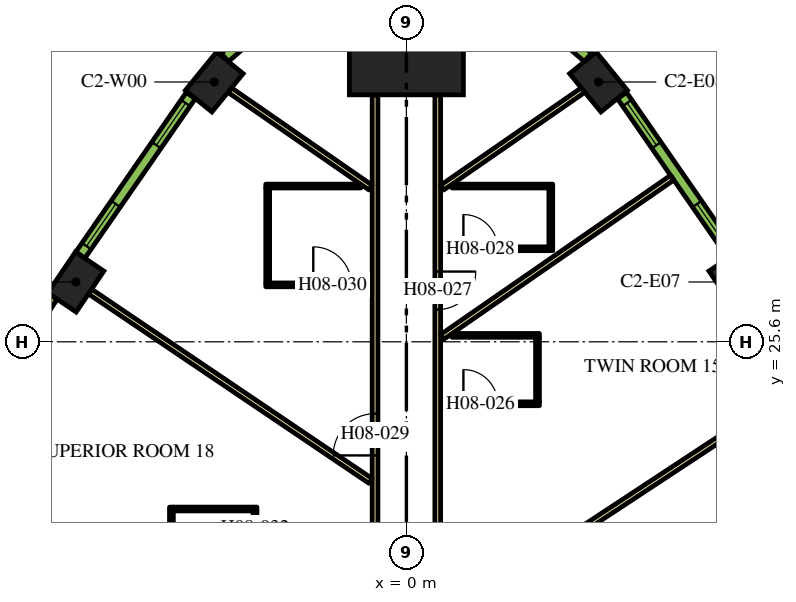
"""IFC4 building model, lengths in metres.
Left out: names, types, materials, properties, quantities, classifications, styles, units other than length and angle.
Written with IfcOpenShell. Run it as: python <this file> out.ifc"""

import sys

from ifc_helpers import new_model, si_unit, direction, frame, frame_2d, origin, origin_2d, place, context, subcontext, project, spatial, rectangle, extrude, element, fill, save


model = new_model("IFC4")
c1 = context("Model", 3, precision=1e-05, world=origin(), true_north=direction((0.0, 1.0)))
c2 = subcontext(c1, "Body", "Model", "MODEL_VIEW")
j1 = project(units=[si_unit("LENGTHUNIT", "METRE"), si_unit("PLANEANGLEUNIT", "RADIAN")], contexts=[c1])
p1 = place(None, origin())
s1 = spatial("IfcSite", under=j1, at=p1, CompositionType="ELEMENT")
p2 = place(p1, origin())
s2 = spatial("IfcBuilding", under=s1, at=p2, CompositionType="ELEMENT")
p3 = place(p2, frame((0.0, 0.0, 111.0)))
s3 = spatial("IfcBuildingStorey", under=s2, at=p3, CompositionType="ELEMENT", Elevation=111.0)
p4 = place(p3, frame((0.0, 33.598, 0.0), z_axis=(0.0, 0.0, 1.0), x_axis=(0.0, 1.0, 0.0)))
e1 = element("IfcColumn", 1, at=p4, inside=s3, PredefinedType="COLUMN", context=c2, shape_type="SweptSolid", body=[
    extrude(rectangle(XDim=3.0, YDim=3.0, at=origin_2d()), origin(), (0.0, 0.0, 1.0), 3.9),
])
for number, where, z_axis, x_axis in (
    (2, (8.699, 27.174, 0.0), (0.0, 0.0, 1.0), (-0.559, 0.829, 0.0)),
    (3, (5.056, 32.437, 0.0), (0.0, 0.0, 1.0), (-0.632, 0.775, 0.0)),
    (4, (-5.056, 32.437, 0.0), (0.0, 0.0, 1.0), (-0.632, -0.775, 0.0)),
    (5, (-8.699, 27.174, 0.0), (0.0, 0.0, 1.0), (-0.559, -0.829, 0.0)),
):
    element("IfcColumn", number, at=place(p3, frame(where, z_axis=z_axis, x_axis=x_axis)), inside=s3, PredefinedType="COLUMN", context=c2, shape_type="SweptSolid", body=[
        extrude(rectangle(XDim=1.3, YDim=0.9, at=origin_2d()), origin(), (0.0, 0.0, 1.0), 3.9),
    ])
p5 = place(p3, frame((0.825, 32.098, 0.0), z_axis=(0.0, 0.0, 1.0), x_axis=(0.0, -1.0, 0.0)))
e6 = element("IfcWall", 6, at=p5, inside=s3, PredefinedType="PARTITIONING", context=c2, shape_type="SweptSolid", body=[
    extrude(rectangle(XDim=13.543, YDim=0.15, at=frame_2d((6.772, 0.0))), origin(), (0.0, 0.0, 1.0), 2.75),
])
p6 = place(p5, frame((12.213, 0.0, 0.0)))
e7 = element("IfcOpeningElement", 7, at=p6, cuts=e6, PredefinedType="OPENING", context=c2, shape_type="SweptSolid", body=[
    extrude(rectangle(XDim=1.0, YDim=2.1, at=frame_2d((0.5, 1.05))), frame((0.0, 0.085, 0.0), z_axis=(0.0, -1.0, 0.0), x_axis=(1.0, 0.0, 0.0)), (0.0, 0.0, 1.0), 0.17),
])
p7 = place(p5, frame((4.65, 0.0, 0.0)))
e8 = element("IfcOpeningElement", 8, at=p7, cuts=e6, PredefinedType="OPENING", context=c2, shape_type="SweptSolid", body=[
    extrude(rectangle(XDim=1.0, YDim=2.1, at=frame_2d((0.5, 1.05))), frame((0.0, 0.085, 0.0), z_axis=(0.0, -1.0, 0.0), x_axis=(1.0, 0.0, 0.0)), (0.0, 0.0, 1.0), 0.17),
])
p8 = place(p3, frame((-0.825, 18.475, 0.0), z_axis=(0.0, 0.0, 1.0), x_axis=(0.0, 1.0, 0.0)))
e9 = element("IfcWall", 9, at=p8, inside=s3, PredefinedType="PARTITIONING", context=c2, shape_type="SweptSolid", body=[
    extrude(rectangle(XDim=13.623, YDim=0.15, at=frame_2d((6.812, 0.0))), origin(), (0.0, 0.0, 1.0), 2.75),
])
p9 = place(p8, frame((4.135, 0.0, 0.0)))
e10 = element("IfcOpeningElement", 10, at=p9, cuts=e9, PredefinedType="OPENING", context=c2, shape_type="SweptSolid", body=[
    extrude(rectangle(XDim=1.1, YDim=2.1, at=frame_2d((0.55, 1.05))), frame((0.0, 0.085, 0.0), z_axis=(0.0, -1.0, 0.0), x_axis=(1.0, 0.0, 0.0)), (0.0, 0.0, 1.0), 0.17),
])
p10 = place(p3, frame((-11.838, 21.585, 0.0), z_axis=(0.0, 0.0, 1.0), x_axis=(0.841699322813, -0.539946525108, 0.0)))
e11 = element("IfcWall", 11, at=p10, inside=s3, PredefinedType="PARTITIONING", context=c2, shape_type="SweptSolid", body=[
    extrude(rectangle(XDim=6.392, YDim=0.15, at=frame_2d((3.196, 0.0))), origin(), (0.0, 0.0, 1.0), 2.75),
])
p11 = place(p3, frame((-8.326, 26.923, 0.0), z_axis=(0.0, 0.0, 1.0), x_axis=(0.828836601893, -0.5594907393, 0.0)))
e12 = element("IfcWall", 12, at=p11, inside=s3, PredefinedType="PARTITIONING", context=c2, shape_type="SweptSolid", body=[
    extrude(rectangle(XDim=8.909, YDim=0.15, at=frame_2d((4.455, 0.0))), origin(), (0.0, 0.0, 1.0), 2.75),
])
p12 = place(p3, frame((-4.649, 32.223, 0.0), z_axis=(0.0, 0.0, 1.0), x_axis=(0.822262349475, -0.569108626394, 0.0)))
e13 = element("IfcWall", 13, at=p12, inside=s3, PredefinedType="PARTITIONING", context=c2, shape_type="SweptSolid", body=[
    extrude(rectangle(XDim=4.51, YDim=0.15, at=frame_2d((2.255, 0.0))), origin(), (0.0, 0.0, 1.0), 2.75),
])
p13 = place(p3, frame((6.994, 29.917, 0.0), z_axis=(0.0, 0.0, 1.0), x_axis=(-0.822255462494, -0.569118576747, 0.0)))
e14 = element("IfcWall", 14, at=p13, inside=s3, PredefinedType="PARTITIONING", context=c2, shape_type="SweptSolid", body=[
    extrude(rectangle(XDim=7.362, YDim=0.15, at=frame_2d((3.681, 0.0))), origin(), (0.0, 0.0, 1.0), 2.75),
])
p14 = place(p3, frame((10.592, 24.589, 0.0), z_axis=(0.0, 0.0, 1.0), x_axis=(-0.835337323748, -0.549737715236, 0.0)))
e15 = element("IfcWall", 15, at=p14, inside=s3, PredefinedType="PARTITIONING", context=c2, shape_type="SweptSolid", body=[
    extrude(rectangle(XDim=10.875, YDim=0.15, at=frame_2d((5.438, 0.0))), origin(), (0.0, 0.0, 1.0), 2.75),
])
p15 = place(p3, frame((4.649, 32.223, 0.0), z_axis=(0.0, 0.0, 1.0), x_axis=(-0.822262349475, -0.569108626394, 0.0)))
e16 = element("IfcWall", 16, at=p15, inside=s3, PredefinedType="PARTITIONING", context=c2, shape_type="SweptSolid", body=[
    extrude(rectangle(XDim=4.51, YDim=0.15, at=frame_2d((2.255, 0.0))), origin(), (0.0, 0.0, 1.0), 2.75),
])
p16 = place(p3, frame((0.9, 23.969, 0.0), z_axis=(0.0, 0.0, 1.0), x_axis=(1.0, 0.0, 0.0)))
e17 = element("IfcWall", 17, at=p16, inside=s3, PredefinedType="PARTITIONING", context=c2, shape_type="SweptSolid", body=[
    extrude(rectangle(XDim=2.6, YDim=0.1, at=frame_2d((1.3, 0.0))), origin(), (0.0, 0.0, 1.0), 2.75),
])
p17 = place(p16, frame((0.6, 0.0, 0.0)))
e18 = element("IfcOpeningElement", 18, at=p17, cuts=e17, PredefinedType="OPENING", context=c2, shape_type="SweptSolid", body=[
    extrude(rectangle(XDim=0.9, YDim=2.1, at=frame_2d((0.45, 1.05))), frame((0.0, 0.06, 0.0), z_axis=(0.0, -1.0, 0.0), x_axis=(1.0, 0.0, 0.0)), (0.0, 0.0, 1.0), 0.12),
])
p18 = place(p3, frame((3.45, 24.019, 0.0), z_axis=(0.0, 0.0, 1.0), x_axis=(0.0, 1.0, 0.0)))
e19 = element("IfcWall", 19, at=p18, inside=s3, PredefinedType="PARTITIONING", context=c2, shape_type="SweptSolid", body=[
    extrude(rectangle(XDim=1.7, YDim=0.1, at=frame_2d((0.85, 0.0))), origin(), (0.0, 0.0, 1.0), 2.75),
])
p19 = place(p3, frame((1.2, 25.769, 0.0), z_axis=(0.0, 0.0, 1.0), x_axis=(1.0, 0.0, 0.0)))
e20 = element("IfcWall", 20, at=p19, inside=s3, PredefinedType="PARTITIONING", context=c2, shape_type="SweptSolid", body=[
    extrude(rectangle(XDim=2.3, YDim=0.1, at=frame_2d((1.15, 0.0))), origin(), (0.0, 0.0, 1.0), 2.75),
])
p20 = place(p3, frame((0.9, 28.048, 0.0), z_axis=(0.0, 0.0, 1.0), x_axis=(1.0, 0.0, 0.0)))
e21 = element("IfcWall", 21, at=p20, inside=s3, PredefinedType="PARTITIONING", context=c2, shape_type="SweptSolid", body=[
    extrude(rectangle(XDim=2.95, YDim=0.1, at=frame_2d((1.475, 0.0))), origin(), (0.0, 0.0, 1.0), 2.75),
])
p21 = place(p20, frame((0.6, 0.0, 0.0)))
e22 = element("IfcOpeningElement", 22, at=p21, cuts=e21, PredefinedType="OPENING", context=c2, shape_type="SweptSolid", body=[
    extrude(rectangle(XDim=0.9, YDim=2.1, at=frame_2d((0.45, 1.05))), frame((0.0, 0.06, 0.0), z_axis=(0.0, -1.0, 0.0), x_axis=(1.0, 0.0, 0.0)), (0.0, 0.0, 1.0), 0.12),
])
p22 = place(p3, frame((3.8, 28.098, 0.0), z_axis=(0.0, 0.0, 1.0), x_axis=(0.0, 1.0, 0.0)))
e23 = element("IfcWall", 23, at=p22, inside=s3, PredefinedType="PARTITIONING", context=c2, shape_type="SweptSolid", body=[
    extrude(rectangle(XDim=1.55, YDim=0.1, at=frame_2d((0.775, 0.0))), origin(), (0.0, 0.0, 1.0), 2.75),
])
p23 = place(p3, frame((1.2, 29.698, 0.0), z_axis=(0.0, 0.0, 1.0), x_axis=(1.0, 0.0, 0.0)))
e24 = element("IfcWall", 24, at=p23, inside=s3, PredefinedType="PARTITIONING", context=c2, shape_type="SweptSolid", body=[
    extrude(rectangle(XDim=2.65, YDim=0.1, at=frame_2d((1.325, 0.0))), origin(), (0.0, 0.0, 1.0), 2.75),
])
p24 = place(p3, frame((-3.7, 27.098, 0.0), z_axis=(0.0, 0.0, 1.0), x_axis=(1.0, 0.0, 0.0)))
e25 = element("IfcWall", 25, at=p24, inside=s3, PredefinedType="PARTITIONING", context=c2, shape_type="SweptSolid", body=[
    extrude(rectangle(XDim=2.8, YDim=0.1, at=frame_2d((1.4, 0.0))), origin(), (0.0, 0.0, 1.0), 2.75),
])
p25 = place(p24, frame((1.25, 0.0, 0.0)))
e26 = element("IfcOpeningElement", 26, at=p25, cuts=e25, PredefinedType="OPENING", context=c2, shape_type="SweptSolid", body=[
    extrude(rectangle(XDim=1.0, YDim=2.1, at=frame_2d((0.5, 1.05))), frame((0.0, 0.06, 0.0), z_axis=(0.0, -1.0, 0.0), x_axis=(1.0, 0.0, 0.0)), (0.0, 0.0, 1.0), 0.12),
])
for number, where, z_axis, x_axis in (
    (27, (-3.65, 27.148, 0.0), (0.0, 0.0, 1.0), (0.0, 1.0, 0.0)),
    (28, (-1.2, 29.698, 0.0), (0.0, 0.0, 1.0), (-1.0, 0.0, 0.0)),
):
    element("IfcWall", number, at=place(p3, frame(where, z_axis=z_axis, x_axis=x_axis)), inside=s3, PredefinedType="PARTITIONING", context=c2, shape_type="SweptSolid", body=[
        extrude(rectangle(XDim=2.5, YDim=0.1, at=frame_2d((1.25, 0.0))), origin(), (0.0, 0.0, 1.0), 2.75),
    ])
p26 = place(p3, frame((-3.983, 18.55, 0.0), z_axis=(0.0, 0.0, 1.0), x_axis=(0.0, 1.0, 0.0)))
e29 = element("IfcWall", 29, at=p26, inside=s3, PredefinedType="PARTITIONING", context=c2, shape_type="SweptSolid", body=[
    extrude(rectangle(XDim=2.7, YDim=0.1, at=frame_2d((1.35, 0.0))), origin(), (0.0, 0.0, 1.0), 2.75),
])
p27 = place(p26, frame((0.6, 0.0, 0.0)))
e30 = element("IfcOpeningElement", 30, at=p27, cuts=e29, PredefinedType="OPENING", context=c2, shape_type="SweptSolid", body=[
    extrude(rectangle(XDim=0.9, YDim=2.1, at=frame_2d((0.45, 1.05))), frame((0.0, 0.06, 0.0), z_axis=(0.0, -1.0, 0.0), x_axis=(1.0, 0.0, 0.0)), (0.0, 0.0, 1.0), 0.12),
])
p28 = place(p3, frame((-4.033, 21.2, 0.0), z_axis=(0.0, 0.0, 1.0), x_axis=(-1.0, 0.0, 0.0)))
e31 = element("IfcWall", 31, at=p28, inside=s3, PredefinedType="PARTITIONING", context=c2, shape_type="SweptSolid", body=[
    extrude(rectangle(XDim=2.1, YDim=0.1, at=frame_2d((1.05, 0.0))), origin(), (0.0, 0.0, 1.0), 2.75),
])
p29 = place(p3, frame((-6.183, 18.55, 0.0), z_axis=(0.0, 0.0, 1.0), x_axis=(0.0, 1.0, 0.0)))
e32 = element("IfcWall", 32, at=p29, inside=s3, PredefinedType="PARTITIONING", context=c2, shape_type="SweptSolid", body=[
    extrude(rectangle(XDim=2.7, YDim=0.1, at=frame_2d((1.35, 0.0))), origin(), (0.0, 0.0, 1.0), 2.75),
])
p30 = place(p3, frame((8.58, 27.882, 0.0), z_axis=(0.0, 0.0, 1.0), x_axis=(-0.569113019126, 0.822259309136, 0.0)))
e33 = element("IfcWall", 33, at=p30, inside=s3, PredefinedType="SOLIDWALL", context=c2, shape_type="SweptSolid", body=[
    extrude(rectangle(XDim=5.107, YDim=0.29, at=frame_2d((2.553, 0.0))), origin(), (0.0, 0.0, 1.0), 3.65),
])
p31 = place(p30, frame((0.285, 0.0, 0.9)))
e34 = element("IfcOpeningElement", 34, at=p31, cuts=e33, PredefinedType="OPENING", context=c2, shape_type="SweptSolid", body=[
    extrude(rectangle(XDim=1.35, YDim=2.15, at=frame_2d((0.675, 1.075))), frame((0.0, 0.155, 0.0), z_axis=(0.0, -1.0, 0.0), x_axis=(1.0, 0.0, 0.0)), (0.0, 0.0, 1.0), 0.31),
])
p32 = place(p30, frame((3.516, 0.0, 0.9)))
e35 = element("IfcOpeningElement", 35, at=p32, cuts=e33, PredefinedType="OPENING", context=c2, shape_type="SweptSolid", body=[
    extrude(rectangle(XDim=1.35, YDim=2.15, at=frame_2d((0.675, 1.075))), frame((0.0, 0.155, 0.0), z_axis=(0.0, -1.0, 0.0), x_axis=(1.0, 0.0, 0.0)), (0.0, 0.0, 1.0), 0.31),
])
p33 = place(p3, frame((4.778, 33.082, 0.0), z_axis=(0.0, 0.0, 1.0), x_axis=(-0.754882764627, 0.655859749999, 0.0)))
e36 = element("IfcWall", 36, at=p33, inside=s3, PredefinedType="SOLIDWALL", context=c2, shape_type="SweptSolid", body=[
    extrude(rectangle(XDim=1.82, YDim=0.29, at=frame_2d((0.91, 0.0))), origin(), (0.0, 0.0, 1.0), 3.65),
])
p34 = place(p33, frame((0.46, 0.0, 0.9)))
e37 = element("IfcOpeningElement", 37, at=p34, cuts=e36, PredefinedType="OPENING", context=c2, shape_type="SweptSolid", body=[
    extrude(rectangle(XDim=0.9, YDim=2.15, at=frame_2d((0.45, 1.075))), frame((0.0, 0.155, 0.0), z_axis=(0.0, -1.0, 0.0), x_axis=(1.0, 0.0, 0.0)), (0.0, 0.0, 1.0), 0.31),
])
p35 = place(p3, frame((-3.405, 34.275, 0.0), z_axis=(0.0, 0.0, 1.0), x_axis=(-0.754882764627, -0.655859749999, 0.0)))
e38 = element("IfcWall", 38, at=p35, inside=s3, PredefinedType="SOLIDWALL", context=c2, shape_type="SweptSolid", body=[
    extrude(rectangle(XDim=1.82, YDim=0.29, at=frame_2d((0.91, 0.0))), origin(), (0.0, 0.0, 1.0), 3.65),
])
p36 = place(p35, frame((0.46, 0.0, 0.9)))
e39 = element("IfcOpeningElement", 39, at=p36, cuts=e38, PredefinedType="OPENING", context=c2, shape_type="SweptSolid", body=[
    extrude(rectangle(XDim=0.9, YDim=2.15, at=frame_2d((0.45, 1.075))), frame((0.0, 0.155, 0.0), z_axis=(0.0, -1.0, 0.0), x_axis=(1.0, 0.0, 0.0)), (0.0, 0.0, 1.0), 0.31),
])
p37 = place(p3, frame((-5.673, 32.081, 0.0), z_axis=(0.0, 0.0, 1.0), x_axis=(-0.569113019126, -0.822259309136, 0.0)))
e40 = element("IfcWall", 40, at=p37, inside=s3, PredefinedType="SOLIDWALL", context=c2, shape_type="SweptSolid", body=[
    extrude(rectangle(XDim=5.107, YDim=0.29, at=frame_2d((2.553, 0.0))), origin(), (0.0, 0.0, 1.0), 3.65),
])
p38 = place(p37, frame((0.24, 0.0, 0.9)))
e41 = element("IfcOpeningElement", 41, at=p38, cuts=e40, PredefinedType="OPENING", context=c2, shape_type="SweptSolid", body=[
    extrude(rectangle(XDim=1.35, YDim=2.15, at=frame_2d((0.675, 1.075))), frame((0.0, 0.155, 0.0), z_axis=(0.0, -1.0, 0.0), x_axis=(1.0, 0.0, 0.0)), (0.0, 0.0, 1.0), 0.31),
])
p39 = place(p37, frame((3.471, 0.0, 0.9)))
e42 = element("IfcOpeningElement", 42, at=p39, cuts=e40, PredefinedType="OPENING", context=c2, shape_type="SweptSolid", body=[
    extrude(rectangle(XDim=1.35, YDim=2.15, at=frame_2d((0.675, 1.075))), frame((0.0, 0.155, 0.0), z_axis=(0.0, -1.0, 0.0), x_axis=(1.0, 0.0, 0.0)), (0.0, 0.0, 1.0), 0.31),
])
p40 = place(p3, frame((-9.311, 26.799, 0.0), z_axis=(0.0, 0.0, 1.0), x_axis=(-0.549741341923, -0.835334937005, 0.0)))
e43 = element("IfcWall", 43, at=p40, inside=s3, PredefinedType="SOLIDWALL", context=c2, shape_type="SweptSolid", body=[
    extrude(rectangle(XDim=5.1, YDim=0.29, at=frame_2d((2.55, 0.0))), origin(), (0.0, 0.0, 1.0), 3.65),
])
p41 = place(p40, frame((0.273, 0.0, 0.9)))
e44 = element("IfcOpeningElement", 44, at=p41, cuts=e43, PredefinedType="OPENING", context=c2, shape_type="SweptSolid", body=[
    extrude(rectangle(XDim=1.35, YDim=2.15, at=frame_2d((0.675, 1.075))), frame((0.0, 0.155, 0.0), z_axis=(0.0, -1.0, 0.0), x_axis=(1.0, 0.0, 0.0)), (0.0, 0.0, 1.0), 0.31),
])
p42 = place(p40, frame((3.478, 0.0, 0.9)))
e45 = element("IfcOpeningElement", 45, at=p42, cuts=e43, PredefinedType="OPENING", context=c2, shape_type="SweptSolid", body=[
    extrude(rectangle(XDim=1.35, YDim=2.15, at=frame_2d((0.675, 1.075))), frame((0.0, 0.155, 0.0), z_axis=(0.0, -1.0, 0.0), x_axis=(1.0, 0.0, 0.0)), (0.0, 0.0, 1.0), 0.31),
])
p43 = place(p17, origin())
e46 = element("IfcDoor", 46, at=p43, inside=s3, OperationType="SINGLE_SWING_RIGHT", PredefinedType="DOOR", context=c2, shape_type="SweptSolid", body=[
    extrude(rectangle(XDim=0.9, YDim=2.1, at=frame_2d((0.45, 1.05))), frame((0.0, 0.025, 0.0), z_axis=(0.0, -1.0, 0.0), x_axis=(1.0, 0.0, 0.0)), (0.0, 0.0, 1.0), 0.05),
])
fill(e18, e46)
p44 = place(p7, origin())
e47 = element("IfcDoor", 47, at=p44, inside=s3, OperationType="SINGLE_SWING_RIGHT", PredefinedType="DOOR", context=c2, shape_type="SweptSolid", body=[
    extrude(rectangle(XDim=1.0, YDim=2.1, at=frame_2d((0.5, 1.05))), frame((0.0, 0.025, 0.0), z_axis=(0.0, -1.0, 0.0), x_axis=(1.0, 0.0, 0.0)), (0.0, 0.0, 1.0), 0.05),
])
fill(e8, e47)
p45 = place(p21, origin())
e48 = element("IfcDoor", 48, at=p45, inside=s3, OperationType="SINGLE_SWING_LEFT", PredefinedType="DOOR", context=c2, shape_type="SweptSolid", body=[
    extrude(rectangle(XDim=0.9, YDim=2.1, at=frame_2d((0.45, 1.05))), frame((0.0, 0.025, 0.0), z_axis=(0.0, -1.0, 0.0), x_axis=(1.0, 0.0, 0.0)), (0.0, 0.0, 1.0), 0.05),
])
fill(e22, e48)
p46 = place(p9, origin())
e49 = element("IfcDoor", 49, at=p46, inside=s3, OperationType="SINGLE_SWING_LEFT", PredefinedType="DOOR", context=c2, shape_type="SweptSolid", body=[
    extrude(rectangle(XDim=1.1, YDim=2.1, at=frame_2d((0.55, 1.05))), frame((0.0, 0.025, 0.0), z_axis=(0.0, -1.0, 0.0), x_axis=(1.0, 0.0, 0.0)), (0.0, 0.0, 1.0), 0.05),
])
fill(e10, e49)
p47 = place(p25, origin())
e50 = element("IfcDoor", 50, at=p47, inside=s3, OperationType="SINGLE_SWING_LEFT", PredefinedType="DOOR", context=c2, shape_type="SweptSolid", body=[
    extrude(rectangle(XDim=1.0, YDim=2.1, at=frame_2d((0.5, 1.05))), frame((0.0, 0.025, 0.0), z_axis=(0.0, -1.0, 0.0), x_axis=(1.0, 0.0, 0.0)), (0.0, 0.0, 1.0), 0.05),
])
fill(e26, e50)
p48 = place(p31, origin())
e51 = element("IfcWindow", 51, at=p48, inside=s3, PartitioningType="DOUBLE_PANEL_VERTICAL", PredefinedType="WINDOW", context=c2, shape_type="SweptSolid", body=[
    extrude(rectangle(XDim=1.35, YDim=2.15, at=frame_2d((0.675, 1.075))), frame((0.0, 0.015, 0.0), z_axis=(0.0, -1.0, 0.0), x_axis=(1.0, 0.0, 0.0)), (0.0, 0.0, 1.0), 0.06),
])
fill(e34, e51)
p49 = place(p32, origin())
e52 = element("IfcWindow", 52, at=p49, inside=s3, PartitioningType="DOUBLE_PANEL_VERTICAL", PredefinedType="WINDOW", context=c2, shape_type="SweptSolid", body=[
    extrude(rectangle(XDim=1.35, YDim=2.15, at=frame_2d((0.675, 1.075))), frame((0.0, 0.015, 0.0), z_axis=(0.0, -1.0, 0.0), x_axis=(1.0, 0.0, 0.0)), (0.0, 0.0, 1.0), 0.06),
])
fill(e35, e52)
p50 = place(p38, origin())
e53 = element("IfcWindow", 53, at=p50, inside=s3, PartitioningType="DOUBLE_PANEL_VERTICAL", PredefinedType="WINDOW", context=c2, shape_type="SweptSolid", body=[
    extrude(rectangle(XDim=1.35, YDim=2.15, at=frame_2d((0.675, 1.075))), frame((0.0, 0.015, 0.0), z_axis=(0.0, -1.0, 0.0), x_axis=(1.0, 0.0, 0.0)), (0.0, 0.0, 1.0), 0.06),
])
fill(e41, e53)
p51 = place(p39, origin())
e54 = element("IfcWindow", 54, at=p51, inside=s3, PartitioningType="DOUBLE_PANEL_VERTICAL", PredefinedType="WINDOW", context=c2, shape_type="SweptSolid", body=[
    extrude(rectangle(XDim=1.35, YDim=2.15, at=frame_2d((0.675, 1.075))), frame((0.0, 0.015, 0.0), z_axis=(0.0, -1.0, 0.0), x_axis=(1.0, 0.0, 0.0)), (0.0, 0.0, 1.0), 0.06),
])
fill(e42, e54)
save(model, sys.argv[1])
